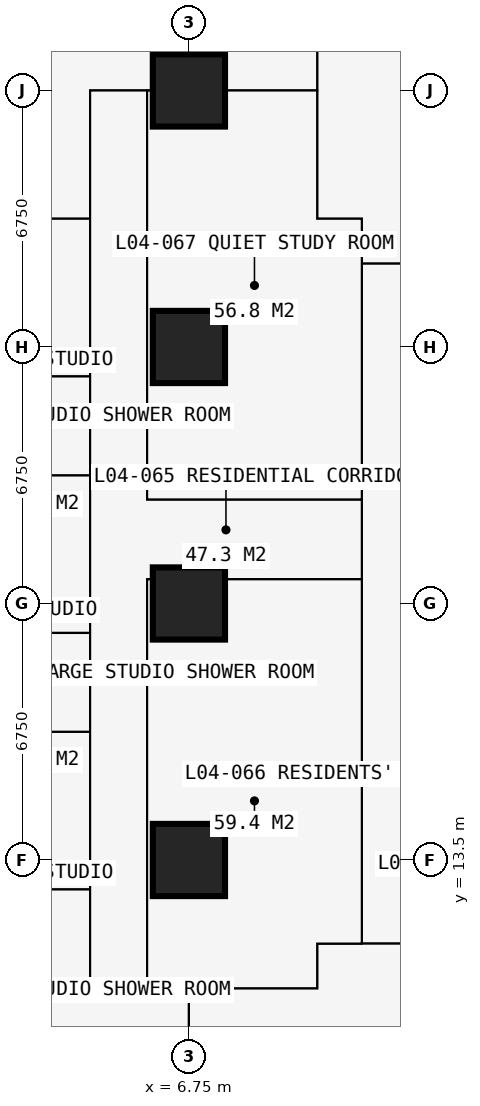
"""IFC4 building model, lengths in metres.
Left out: names, types, materials, properties, quantities, classifications, styles, units other than length and angle.
Written with IfcOpenShell. Run it as: python <this file> out.ifc"""

import sys

from ifc_helpers import new_model, si_unit, direction, frame, frame_2d, origin, origin_2d, place, context, subcontext, project, spatial, rectangle, extrude, element, fill, save


model = new_model("IFC4")
c1 = context("Model", 3, precision=1e-05, world=origin(), true_north=direction((0.0, 1.0)))
c2 = subcontext(c1, "Body", "Model", "MODEL_VIEW")
j1 = project(units=[si_unit("LENGTHUNIT", "METRE"), si_unit("PLANEANGLEUNIT", "RADIAN")], contexts=[c1])
p1 = place(None, origin())
s1 = spatial("IfcSite", under=j1, at=p1, CompositionType="ELEMENT")
p2 = place(p1, origin())
s2 = spatial("IfcBuilding", under=s1, at=p2, CompositionType="ELEMENT")
p3 = place(p2, frame((0.0, 0.0, 18.0)))
s3 = spatial("IfcBuildingStorey", under=s2, at=p3, CompositionType="ELEMENT", Elevation=18.0)
for number, where, z_axis, x_axis in (
    (1, (6.75, 13.5, 0.0), (0.0, 0.0, 1.0), (1.0, 0.0, 0.0)),
    (2, (6.75, 20.25, 0.0), (0.0, 0.0, 1.0), (1.0, 0.0, 0.0)),
    (3, (6.75, 27.0, 0.0), (0.0, 0.0, 1.0), (1.0, 0.0, 0.0)),
    (4, (6.75, 33.75, 0.0), (0.0, 0.0, 1.0), (1.0, 0.0, 0.0)),
):
    element("IfcColumn", number, at=place(p3, frame(where, z_axis=z_axis, x_axis=x_axis)), inside=s3, PredefinedType="COLUMN", context=c2, shape_type="SweptSolid", body=[
        extrude(rectangle(XDim=1.9, YDim=1.9, at=origin_2d()), origin(), (0.0, 0.0, 1.0), 3.6),
    ])
p4 = place(p3, frame((-0.734, 10.125, 0.0), z_axis=(0.0, 0.0, 1.0), x_axis=(1.0, 0.0, 0.0)))
e5 = element("IfcWall", 5, at=p4, inside=s3, PredefinedType="PARTITIONING", context=c2, shape_type="SweptSolid", body=[
    extrude(rectangle(XDim=10.859, YDim=0.15, at=frame_2d((5.429, 0.0))), origin(), (0.0, 0.0, 1.0), 3.375),
])
p5 = place(p3, frame((-0.734, 16.875, 0.0), z_axis=(0.0, 0.0, 1.0), x_axis=(1.0, 0.0, 0.0)))
e6 = element("IfcWall", 6, at=p5, inside=s3, PredefinedType="PARTITIONING", context=c2, shape_type="SweptSolid", body=[
    extrude(rectangle(XDim=4.884, YDim=0.175, at=frame_2d((2.442, 0.0))), origin(), (0.0, 0.0, 1.0), 3.375),
])
p6 = place(p5, frame((3.234, 0.0, 0.0)))
e7 = element("IfcOpeningElement", 7, at=p6, cuts=e6, PredefinedType="OPENING", context=c2, shape_type="SweptSolid", body=[
    extrude(rectangle(XDim=0.9, YDim=2.2, at=frame_2d((0.45, 1.1))), frame((0.0, 0.097, 0.0), z_axis=(0.0, -1.0, 0.0), x_axis=(1.0, 0.0, 0.0)), (0.0, 0.0, 1.0), 0.195),
])
p7 = place(p3, frame((-0.734, 23.625, 0.0), z_axis=(0.0, 0.0, 1.0), x_axis=(1.0, 0.0, 0.0)))
e8 = element("IfcWall", 8, at=p7, inside=s3, PredefinedType="PARTITIONING", context=c2, shape_type="SweptSolid", body=[
    extrude(rectangle(XDim=4.884, YDim=0.175, at=frame_2d((2.442, 0.0))), origin(), (0.0, 0.0, 1.0), 3.375),
])
p8 = place(p7, frame((3.234, 0.0, 0.0)))
e9 = element("IfcOpeningElement", 9, at=p8, cuts=e8, PredefinedType="OPENING", context=c2, shape_type="SweptSolid", body=[
    extrude(rectangle(XDim=0.9, YDim=2.2, at=frame_2d((0.45, 1.1))), frame((0.0, 0.097, 0.0), z_axis=(0.0, -1.0, 0.0), x_axis=(1.0, 0.0, 0.0)), (0.0, 0.0, 1.0), 0.195),
])
p9 = place(p3, frame((-0.734, 30.375, 0.0), z_axis=(0.0, 0.0, 1.0), x_axis=(1.0, 0.0, 0.0)))
e10 = element("IfcWall", 10, at=p9, inside=s3, PredefinedType="PARTITIONING", context=c2, shape_type="SweptSolid", body=[
    extrude(rectangle(XDim=4.884, YDim=0.15, at=frame_2d((2.442, 0.0))), origin(), (0.0, 0.0, 1.0), 3.375),
])
for number, where, z_axis, x_axis in (
    (11, (1.75, 12.725, 0.0), (0.0, 0.0, 1.0), (1.0, 0.0, 0.0)),
    (12, (1.75, 19.475, 0.0), (0.0, 0.0, 1.0), (1.0, 0.0, 0.0)),
    (13, (1.75, 26.225, 0.0), (0.0, 0.0, 1.0), (1.0, 0.0, 0.0)),
):
    element("IfcWall", number, at=place(p3, frame(where, z_axis=z_axis, x_axis=x_axis)), inside=s3, PredefinedType="PARTITIONING", context=c2, shape_type="SweptSolid", body=[
        extrude(rectangle(XDim=2.4, YDim=0.1, at=frame_2d((1.2, 0.0))), origin(), (0.0, 0.0, 1.0), 3.375),
    ])
p10 = place(p3, frame((4.15, 10.125, 0.0), z_axis=(0.0, 0.0, 1.0), x_axis=(0.0, 1.0, 0.0)))
e14 = element("IfcWall", 14, at=p10, inside=s3, PredefinedType="PARTITIONING", context=c2, shape_type="SweptSolid", body=[
    extrude(rectangle(XDim=23.625, YDim=0.15, at=frame_2d((11.812, 0.0))), origin(), (0.0, 0.0, 1.0), 3.375),
])
p11 = place(p10, frame((4.2, 0.0, 0.0)))
e15 = element("IfcOpeningElement", 15, at=p11, cuts=e14, PredefinedType="OPENING", context=c2, shape_type="SweptSolid", body=[
    extrude(rectangle(XDim=0.95, YDim=2.2, at=frame_2d((0.475, 1.1))), frame((0.0, 0.085, 0.0), z_axis=(0.0, -1.0, 0.0), x_axis=(1.0, 0.0, 0.0)), (0.0, 0.0, 1.0), 0.17),
])
p12 = place(p10, frame((10.95, 0.0, 0.0)))
e16 = element("IfcOpeningElement", 16, at=p12, cuts=e14, PredefinedType="OPENING", context=c2, shape_type="SweptSolid", body=[
    extrude(rectangle(XDim=0.95, YDim=2.2, at=frame_2d((0.475, 1.1))), frame((0.0, 0.085, 0.0), z_axis=(0.0, -1.0, 0.0), x_axis=(1.0, 0.0, 0.0)), (0.0, 0.0, 1.0), 0.17),
])
p13 = place(p10, frame((17.7, 0.0, 0.0)))
e17 = element("IfcOpeningElement", 17, at=p13, cuts=e14, PredefinedType="OPENING", context=c2, shape_type="SweptSolid", body=[
    extrude(rectangle(XDim=0.95, YDim=2.2, at=frame_2d((0.475, 1.1))), frame((0.0, 0.085, 0.0), z_axis=(0.0, -1.0, 0.0), x_axis=(1.0, 0.0, 0.0)), (0.0, 0.0, 1.0), 0.17),
])
p14 = place(p3, frame((4.15, 33.75, 0.0), z_axis=(0.0, 0.0, 1.0), x_axis=(1.0, 0.0, 0.0)))
e18 = element("IfcWall", 18, at=p14, inside=s3, PredefinedType="PARTITIONING", context=c2, shape_type="SweptSolid", body=[
    extrude(rectangle(XDim=5.975, YDim=0.15, at=frame_2d((2.988, 0.0))), origin(), (0.0, 0.0, 1.0), 2.877),
])
p15 = place(p3, frame((5.65, 10.125, 0.0), z_axis=(0.0, 0.0, 1.0), x_axis=(0.0, 1.0, 0.0)))
e19 = element("IfcWall", 19, at=p15, inside=s3, PredefinedType="PARTITIONING", context=c2, shape_type="SweptSolid", body=[
    extrude(rectangle(XDim=10.762, YDim=0.15, at=frame_2d((5.381, 0.0))), origin(), (0.0, 0.0, 1.0), 3.375),
])
p16 = place(p15, frame((4.9, 0.0, 0.0)))
e20 = element("IfcOpeningElement", 20, at=p16, cuts=e19, PredefinedType="OPENING", context=c2, shape_type="SweptSolid", body=[
    extrude(rectangle(XDim=0.95, YDim=2.2, at=frame_2d((0.475, 1.1))), frame((0.0, 0.085, 0.0), z_axis=(0.0, -1.0, 0.0), x_axis=(1.0, 0.0, 0.0)), (0.0, 0.0, 1.0), 0.17),
])
p17 = place(p3, frame((5.65, 20.887, 0.0), z_axis=(0.0, 0.0, 1.0), x_axis=(1.0, 0.0, 0.0)))
e21 = element("IfcWall", 21, at=p17, inside=s3, PredefinedType="PARTITIONING", context=c2, shape_type="SweptSolid", body=[
    extrude(rectangle(XDim=5.65, YDim=0.15, at=frame_2d((2.825, 0.0))), origin(), (0.0, 0.0, 1.0), 3.375),
])
p18 = place(p3, frame((5.65, 22.988, 0.0), z_axis=(0.0, 0.0, 1.0), x_axis=(0.0, 1.0, 0.0)))
e22 = element("IfcWall", 22, at=p18, inside=s3, PredefinedType="PARTITIONING", context=c2, shape_type="SweptSolid", body=[
    extrude(rectangle(XDim=10.762, YDim=0.15, at=frame_2d((5.381, 0.0))), origin(), (0.0, 0.0, 1.0), 3.375),
])
p19 = place(p18, frame((5.0, 0.0, 0.0)))
e23 = element("IfcOpeningElement", 23, at=p19, cuts=e22, PredefinedType="OPENING", context=c2, shape_type="SweptSolid", body=[
    extrude(rectangle(XDim=0.95, YDim=2.2, at=frame_2d((0.475, 1.1))), frame((0.0, 0.085, 0.0), z_axis=(0.0, -1.0, 0.0), x_axis=(1.0, 0.0, 0.0)), (0.0, 0.0, 1.0), 0.17),
])
p20 = place(p3, frame((5.65, 22.988, 0.0), z_axis=(0.0, 0.0, 1.0), x_axis=(1.0, 0.0, 0.0)))
e24 = element("IfcWall", 24, at=p20, inside=s3, PredefinedType="PARTITIONING", context=c2, shape_type="SweptSolid", body=[
    extrude(rectangle(XDim=5.65, YDim=0.15, at=frame_2d((2.825, 0.0))), origin(), (0.0, 0.0, 1.0), 3.375),
])
p21 = place(p3, frame((6.75, 4.15, 0.0), z_axis=(0.0, 0.0, 1.0), x_axis=(0.0, 1.0, 0.0)))
e25 = element("IfcWall", 25, at=p21, inside=s3, PredefinedType="PARTITIONING", context=c2, shape_type="SweptSolid", body=[
    extrude(rectangle(XDim=5.975, YDim=0.15, at=frame_2d((2.988, 0.0))), origin(), (0.0, 0.0, 1.0), 2.877),
])
p22 = place(p3, frame((10.125, 10.125, 0.0), z_axis=(0.0, 0.0, 1.0), x_axis=(0.0, 1.0, 0.0)))
e26 = element("IfcWall", 26, at=p22, inside=s3, PredefinedType="PARTITIONING", context=c2, shape_type="SweptSolid", body=[
    extrude(rectangle(XDim=1.175, YDim=0.15, at=frame_2d((0.587, 0.0))), origin(), (0.0, 0.0, 1.0), 3.375),
])
p23 = place(p3, frame((10.125, 11.3, 0.0), z_axis=(0.0, 0.0, 1.0), x_axis=(1.0, 0.0, 0.0)))
e27 = element("IfcWall", 27, at=p23, inside=s3, PredefinedType="PARTITIONING", context=c2, shape_type="SweptSolid", body=[
    extrude(rectangle(XDim=20.675, YDim=0.15, at=frame_2d((10.337, 0.0))), origin(), (0.0, 0.0, 1.0), 3.375),
])
p24 = place(p23, frame((8.375, 0.0, 0.0)))
e28 = element("IfcOpeningElement", 28, at=p24, cuts=e27, PredefinedType="OPENING", context=c2, shape_type="SweptSolid", body=[
    extrude(rectangle(XDim=1.0, YDim=2.2, at=frame_2d((0.5, 1.1))), frame((0.0, 0.085, 0.0), z_axis=(0.0, -1.0, 0.0), x_axis=(1.0, 0.0, 0.0)), (0.0, 0.0, 1.0), 0.17),
])
p25 = place(p23, frame((10.975, 0.0, 0.0)))
e29 = element("IfcOpeningElement", 29, at=p25, cuts=e27, PredefinedType="OPENING", context=c2, shape_type="SweptSolid", body=[
    extrude(rectangle(XDim=1.0, YDim=2.2, at=frame_2d((0.5, 1.1))), frame((0.0, 0.085, 0.0), z_axis=(0.0, -1.0, 0.0), x_axis=(1.0, 0.0, 0.0)), (0.0, 0.0, 1.0), 0.17),
])
p26 = place(p23, frame((3.925, 0.0, 0.0)))
e30 = element("IfcOpeningElement", 30, at=p26, cuts=e27, PredefinedType="OPENING", context=c2, shape_type="SweptSolid", body=[
    extrude(rectangle(XDim=0.95, YDim=2.2, at=frame_2d((0.475, 1.1))), frame((0.0, 0.085, 0.0), z_axis=(0.0, -1.0, 0.0), x_axis=(1.0, 0.0, 0.0)), (0.0, 0.0, 1.0), 0.17),
])
p27 = place(p3, frame((10.125, 30.375, 0.0), z_axis=(0.0, 0.0, 1.0), x_axis=(0.0, 1.0, 0.0)))
e31 = element("IfcWall", 31, at=p27, inside=s3, PredefinedType="PARTITIONING", context=c2, shape_type="SweptSolid", body=[
    extrude(rectangle(XDim=10.859, YDim=0.15, at=frame_2d((5.429, 0.0))), origin(), (0.0, 0.0, 1.0), 3.375),
])
p28 = place(p27, frame((4.725, 0.0, 0.0)))
e32 = element("IfcOpeningElement", 32, at=p28, cuts=e31, PredefinedType="OPENING", context=c2, shape_type="SweptSolid", body=[
    extrude(rectangle(XDim=1.0, YDim=2.2, at=frame_2d((0.5, 1.1))), frame((0.0, 0.085, 0.0), z_axis=(0.0, -1.0, 0.0), x_axis=(1.0, 0.0, 0.0)), (0.0, 0.0, 1.0), 0.17),
])
p29 = place(p3, frame((10.125, 30.375, 0.0), z_axis=(0.0, 0.0, 1.0), x_axis=(1.0, 0.0, 0.0)))
e33 = element("IfcWall", 33, at=p29, inside=s3, PredefinedType="PARTITIONING", context=c2, shape_type="SweptSolid", body=[
    extrude(rectangle(XDim=1.175, YDim=0.15, at=frame_2d((0.587, 0.0))), origin(), (0.0, 0.0, 1.0), 3.375),
])
p30 = place(p3, frame((11.3, 11.3, 0.0), z_axis=(0.0, 0.0, 1.0), x_axis=(0.0, 1.0, 0.0)))
e34 = element("IfcWall", 34, at=p30, inside=s3, PredefinedType="PARTITIONING", context=c2, shape_type="SweptSolid", body=[
    extrude(rectangle(XDim=19.075, YDim=0.15, at=frame_2d((9.538, 0.0))), origin(), (0.0, 0.0, 1.0), 3.375),
])
p31 = place(p30, frame((10.137, 0.0, 0.0)))
e35 = element("IfcOpeningElement", 35, at=p31, cuts=e34, PredefinedType="OPENING", context=c2, shape_type="SweptSolid", body=[
    extrude(rectangle(XDim=1.0, YDim=2.2, at=frame_2d((0.5, 1.1))), frame((0.0, 0.085, 0.0), z_axis=(0.0, -1.0, 0.0), x_axis=(1.0, 0.0, 0.0)), (0.0, 0.0, 1.0), 0.17),
])
p32 = place(p3, frame((11.3, 29.2, 0.0), z_axis=(0.0, 0.0, 1.0), x_axis=(1.0, 0.0, 0.0)))
e36 = element("IfcWall", 36, at=p32, inside=s3, PredefinedType="PARTITIONING", context=c2, shape_type="SweptSolid", body=[
    extrude(rectangle(XDim=19.075, YDim=0.15, at=frame_2d((9.538, 0.0))), origin(), (0.0, 0.0, 1.0), 3.375),
])
p33 = place(p32, frame((10.137, 0.0, 0.0)))
e37 = element("IfcOpeningElement", 37, at=p33, cuts=e36, PredefinedType="OPENING", context=c2, shape_type="SweptSolid", body=[
    extrude(rectangle(XDim=1.0, YDim=2.2, at=frame_2d((0.5, 1.1))), frame((0.0, 0.085, 0.0), z_axis=(0.0, -1.0, 0.0), x_axis=(1.0, 0.0, 0.0)), (0.0, 0.0, 1.0), 0.17),
])
p34 = place(p11, origin())
e38 = element("IfcDoor", 38, at=p34, inside=s3, OperationType="SINGLE_SWING_LEFT", PredefinedType="DOOR", context=c2, shape_type="SweptSolid", body=[
    extrude(rectangle(XDim=0.95, YDim=2.2, at=frame_2d((0.475, 1.1))), frame((0.0, 0.025, 0.0), z_axis=(0.0, -1.0, 0.0), x_axis=(1.0, 0.0, 0.0)), (0.0, 0.0, 1.0), 0.05),
])
fill(e15, e38)
p35 = place(p12, origin())
e39 = element("IfcDoor", 39, at=p35, inside=s3, OperationType="SINGLE_SWING_LEFT", PredefinedType="DOOR", context=c2, shape_type="SweptSolid", body=[
    extrude(rectangle(XDim=0.95, YDim=2.2, at=frame_2d((0.475, 1.1))), frame((0.0, 0.025, 0.0), z_axis=(0.0, -1.0, 0.0), x_axis=(1.0, 0.0, 0.0)), (0.0, 0.0, 1.0), 0.05),
])
fill(e16, e39)
p36 = place(p6, origin())
e40 = element("IfcDoor", 40, at=p36, inside=s3, OperationType="SINGLE_SWING_RIGHT", PredefinedType="DOOR", context=c2, shape_type="SweptSolid", body=[
    extrude(rectangle(XDim=0.9, YDim=2.2, at=frame_2d((0.45, 1.1))), frame((0.0, 0.025, 0.0), z_axis=(0.0, -1.0, 0.0), x_axis=(1.0, 0.0, 0.0)), (0.0, 0.0, 1.0), 0.05),
])
fill(e7, e40)
p37 = place(p13, origin())
e41 = element("IfcDoor", 41, at=p37, inside=s3, OperationType="SINGLE_SWING_LEFT", PredefinedType="DOOR", context=c2, shape_type="SweptSolid", body=[
    extrude(rectangle(XDim=0.95, YDim=2.2, at=frame_2d((0.475, 1.1))), frame((0.0, 0.025, 0.0), z_axis=(0.0, -1.0, 0.0), x_axis=(1.0, 0.0, 0.0)), (0.0, 0.0, 1.0), 0.05),
])
fill(e17, e41)
p38 = place(p8, origin())
e42 = element("IfcDoor", 42, at=p38, inside=s3, OperationType="SINGLE_SWING_RIGHT", PredefinedType="DOOR", context=c2, shape_type="SweptSolid", body=[
    extrude(rectangle(XDim=0.9, YDim=2.2, at=frame_2d((0.45, 1.1))), frame((0.0, 0.025, 0.0), z_axis=(0.0, -1.0, 0.0), x_axis=(1.0, 0.0, 0.0)), (0.0, 0.0, 1.0), 0.05),
])
fill(e9, e42)
p39 = place(p31, origin())
e43 = element("IfcDoor", 43, at=p39, inside=s3, OperationType="SINGLE_SWING_LEFT", PredefinedType="DOOR", context=c2, shape_type="SweptSolid", body=[
    extrude(rectangle(XDim=1.0, YDim=2.2, at=frame_2d((0.5, 1.1))), frame((0.0, 0.025, 0.0), z_axis=(0.0, -1.0, 0.0), x_axis=(1.0, 0.0, 0.0)), (0.0, 0.0, 1.0), 0.05),
])
fill(e35, e43)
p40 = place(p16, origin())
e44 = element("IfcDoor", 44, at=p40, inside=s3, OperationType="SINGLE_SWING_LEFT", PredefinedType="DOOR", context=c2, shape_type="SweptSolid", body=[
    extrude(rectangle(XDim=0.95, YDim=2.2, at=frame_2d((0.475, 1.1))), frame((0.0, 0.025, 0.0), z_axis=(0.0, -1.0, 0.0), x_axis=(1.0, 0.0, 0.0)), (0.0, 0.0, 1.0), 0.05),
])
fill(e20, e44)
p41 = place(p19, origin())
e45 = element("IfcDoor", 45, at=p41, inside=s3, OperationType="SINGLE_SWING_LEFT", PredefinedType="DOOR", context=c2, shape_type="SweptSolid", body=[
    extrude(rectangle(XDim=0.95, YDim=2.2, at=frame_2d((0.475, 1.1))), frame((0.0, 0.025, 0.0), z_axis=(0.0, -1.0, 0.0), x_axis=(1.0, 0.0, 0.0)), (0.0, 0.0, 1.0), 0.05),
])
fill(e23, e45)
save(model, sys.argv[1])
